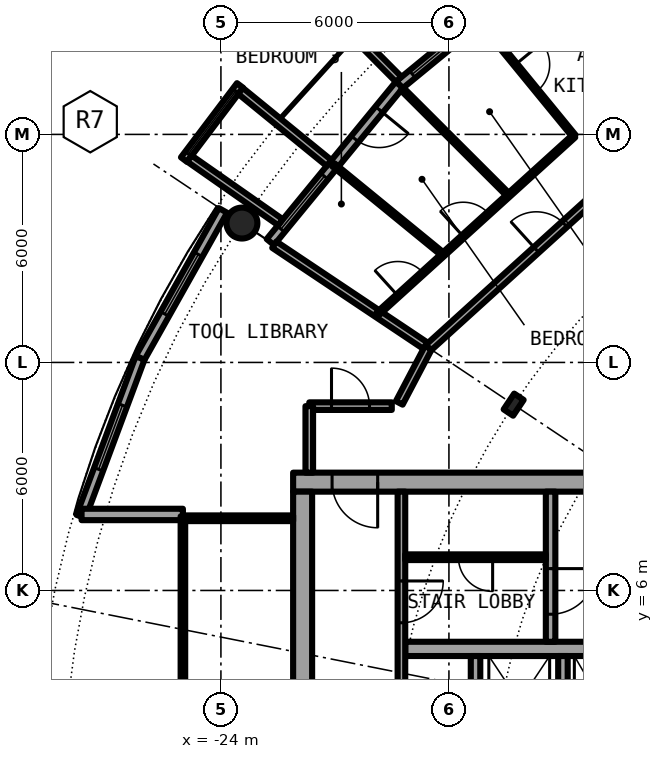
"""IFC4 building model, lengths in metres.
Left out: names, types, materials, properties, quantities, classifications, styles, units other than length and angle.
Written with IfcOpenShell. Run it as: python <this file> out.ifc"""

import sys

from ifc_helpers import new_model, si_unit, direction, frame, frame_2d, origin, origin_2d, place, context, subcontext, project, spatial, rectangle, circle, hollow_circle, i_section, extrude, element, fill, save


model = new_model("IFC4")
c1 = context("Model", 3, precision=1e-05, world=origin(), true_north=direction((0.0, 1.0)))
c2 = subcontext(c1, "Body", "Model", "MODEL_VIEW")
j1 = project(units=[si_unit("LENGTHUNIT", "METRE"), si_unit("PLANEANGLEUNIT", "RADIAN")], contexts=[c1])
p1 = place(None, origin())
s1 = spatial("IfcSite", under=j1, at=p1, CompositionType="ELEMENT")
p2 = place(p1, origin())
s2 = spatial("IfcBuilding", under=s1, at=p2, CompositionType="ELEMENT")
p3 = place(p2, frame((0.0, 0.0, 154.35)))
s3 = spatial("IfcBuildingStorey", under=s2, at=p3, CompositionType="ELEMENT", Elevation=154.35)
p4 = place(p3, frame((-23.448, 15.667, 0.0), z_axis=(0.0, 0.0, 1.0), x_axis=(1.0, 0.0, 0.0)))
e1 = element("IfcColumn", 1, at=p4, inside=s3, PredefinedType="COLUMN", context=c2, shape_type="SweptSolid", body=[
    extrude(hollow_circle(Radius=0.406, WallThickness=0.04, at=origin_2d()), origin(), (0.0, 0.0, 1.0), 3.05),
])
p5 = place(p3, frame((-16.297, 10.889, 0.0), z_axis=(0.0, 0.0, 1.0), x_axis=(-0.831469612303, 0.55557023302, 0.0)))
e2 = element("IfcColumn", 2, at=p5, inside=s3, PredefinedType="COLUMN", context=c2, shape_type="SweptSolid", body=[
    extrude(i_section(OverallWidth=0.3, OverallDepth=0.5, WebThickness=0.014, FlangeThickness=0.028, FilletRadius=0.027, at=origin_2d()), origin(), (0.0, 0.0, 1.0), 3.05),
])
p6 = place(p3, frame((-15.167, 22.699, 0.0), z_axis=(0.0, 0.0, 1.0), x_axis=(-0.773019449054, -0.634382322723, 0.0)))
e3 = element("IfcWall", 3, at=p6, inside=s3, PredefinedType="SOLIDWALL", context=c2, shape_type="SweptSolid", body=[
    extrude(rectangle(XDim=5.352, YDim=0.25, at=frame_2d((2.676, 0.0))), origin(), (0.0, 0.0, 1.0), 2.7),
])
p7 = place(p6, frame((0.841, 0.0, 0.0)))
e4 = element("IfcOpeningElement", 4, at=p7, cuts=e3, PredefinedType="OPENING", context=c2, shape_type="SweptSolid", body=[
    extrude(rectangle(XDim=1.0, YDim=2.2, at=frame_2d((0.5, 1.1))), frame((0.0, 0.135, 0.0), z_axis=(0.0, -1.0, 0.0), x_axis=(1.0, 0.0, 0.0)), (0.0, 0.0, 1.0), 0.27),
])
p8 = place(p6, frame((3.111, 0.0, 0.3)))
e5 = element("IfcOpeningElement", 5, at=p8, cuts=e3, PredefinedType="OPENING", context=c2, shape_type="SweptSolid", body=[
    extrude(rectangle(XDim=1.8, YDim=2.1, at=frame_2d((0.9, 1.05))), frame((0.0, 0.135, 0.0), z_axis=(0.0, -1.0, 0.0), x_axis=(1.0, 0.0, 0.0)), (0.0, 0.0, 1.0), 0.27),
])
p9 = place(p3, frame((-19.323, 19.45, -0.03), z_axis=(0.0, 0.0, 1.0), x_axis=(-0.704476739375, 0.709727076896, 0.0)))
e6 = element("IfcWall", 6, at=p9, inside=s3, PredefinedType="SOLIDWALL", context=c2, shape_type="SweptSolid", body=[
    extrude(rectangle(XDim=2.883, YDim=0.2, at=frame_2d((1.441, 0.0))), origin(), (0.0, 0.0, 1.0), 2.73),
])
p10 = place(p3, frame((-19.304, 19.304, 0.0), z_axis=(0.0, 0.0, 1.0), x_axis=(-0.634382322723, -0.773019449054, 0.0)))
e7 = element("IfcWall", 7, at=p10, inside=s3, PredefinedType="SOLIDWALL", context=c2, shape_type="SweptSolid", body=[
    extrude(rectangle(XDim=5.352, YDim=0.25, at=frame_2d((2.676, 0.0))), origin(), (0.0, 0.0, 1.0), 2.7),
])
p11 = place(p10, frame((0.841, 0.0, 0.0)))
e8 = element("IfcOpeningElement", 8, at=p11, cuts=e7, PredefinedType="OPENING", context=c2, shape_type="SweptSolid", body=[
    extrude(rectangle(XDim=1.0, YDim=2.2, at=frame_2d((0.5, 1.1))), frame((0.0, 0.135, 0.0), z_axis=(0.0, -1.0, 0.0), x_axis=(1.0, 0.0, 0.0)), (0.0, 0.0, 1.0), 0.27),
])
p12 = place(p10, frame((3.111, 0.0, 0.3)))
e9 = element("IfcOpeningElement", 9, at=p12, cuts=e7, PredefinedType="OPENING", context=c2, shape_type="SweptSolid", body=[
    extrude(rectangle(XDim=1.8, YDim=2.1, at=frame_2d((0.9, 1.05))), frame((0.0, 0.135, 0.0), z_axis=(0.0, -1.0, 0.0), x_axis=(1.0, 0.0, 0.0)), (0.0, 0.0, 1.0), 0.27),
])
p13 = place(p3, frame((-23.497, 19.289, -0.03), z_axis=(0.0, 0.0, 1.0), x_axis=(-0.602806268067, -0.797887588059, 0.0)))
e10 = element("IfcWall", 10, at=p13, inside=s3, PredefinedType="SOLIDWALL", context=c2, shape_type="SweptSolid", body=[
    extrude(rectangle(XDim=2.447, YDim=0.2, at=frame_2d((1.223, 0.0))), origin(), (0.0, 0.0, 1.0), 2.73),
])
p14 = place(p13, frame((0.183, 0.0, 0.33)))
e11 = element("IfcOpeningElement", 11, at=p14, cuts=e10, PredefinedType="OPENING", context=c2, shape_type="SweptSolid", body=[
    extrude(circle(Radius=1.04, at=frame_2d((1.04, 1.04))), frame((0.0, 0.11, 0.0), z_axis=(0.0, -1.0, 0.0), x_axis=(1.0, 0.0, 0.0)), (0.0, 0.0, 1.0), 0.22),
])
p15 = place(p3, frame((-21.155, 17.246, -0.03), z_axis=(0.0, 0.0, 1.0), x_axis=(-0.775179004516, 0.631741648902, 0.0)))
e12 = element("IfcWall", 12, at=p15, inside=s3, PredefinedType="SOLIDWALL", context=c2, shape_type="SweptSolid", body=[
    extrude(rectangle(XDim=3.006, YDim=0.2, at=frame_2d((1.503, 0.0))), origin(), (0.0, 0.0, 1.0), 2.73),
])
p16 = place(p3, frame((-22.433, 15.688, -0.03), z_axis=(0.0, 0.0, 1.0), x_axis=(-0.819373043115, 0.573260687834, 0.0)))
e13 = element("IfcWall", 13, at=p16, inside=s3, PredefinedType="SOLIDWALL", context=c2, shape_type="SweptSolid", body=[
    extrude(rectangle(XDim=2.925, YDim=0.2, at=frame_2d((1.463, 0.0))), origin(), (0.0, 0.0, 1.0), 2.73),
])
p17 = place(p3, frame((-23.946, 16.0, 0.0), z_axis=(0.0, 0.0, 1.0), x_axis=(-0.489696356642, -0.871893042919, 0.0)))
e14 = element("IfcWall", 14, at=p17, inside=s3, PredefinedType="SOLIDWALL", context=c2, shape_type="SweptSolid", body=[
    extrude(rectangle(XDim=4.454, YDim=0.25, at=frame_2d((2.227, 0.0))), origin(), (0.0, 0.0, 1.0), 2.7),
])
p18 = place(p17, frame((1.327, 0.0, 0.3)))
e15 = element("IfcOpeningElement", 15, at=p18, cuts=e14, PredefinedType="OPENING", context=c2, shape_type="SweptSolid", body=[
    extrude(rectangle(XDim=1.8, YDim=2.1, at=frame_2d((0.9, 1.05))), frame((0.0, 0.135, 0.0), z_axis=(0.0, -1.0, 0.0), x_axis=(1.0, 0.0, 0.0)), (0.0, 0.0, 1.0), 0.27),
])
p19 = place(p3, frame((-26.127, 12.117, 0.0), z_axis=(0.0, 0.0, 1.0), x_axis=(-0.349247811493, -0.937030397675, 0.0)))
e16 = element("IfcWall", 16, at=p19, inside=s3, PredefinedType="SOLIDWALL", context=c2, shape_type="SweptSolid", body=[
    extrude(rectangle(XDim=4.452, YDim=0.25, at=frame_2d((2.226, 0.0))), origin(), (0.0, 0.0, 1.0), 2.7),
])
p20 = place(p19, frame((1.327, 0.0, 0.3)))
e17 = element("IfcOpeningElement", 17, at=p20, cuts=e16, PredefinedType="OPENING", context=c2, shape_type="SweptSolid", body=[
    extrude(rectangle(XDim=1.8, YDim=2.1, at=frame_2d((0.9, 1.05))), frame((0.0, 0.135, 0.0), z_axis=(0.0, -1.0, 0.0), x_axis=(1.0, 0.0, 0.0)), (0.0, 0.0, 1.0), 0.27),
])
p21 = place(p3, frame((-25.0, 8.0, 0.0), z_axis=(0.0, 0.0, 1.0), x_axis=(-1.0, 0.0, 0.0)))
e18 = element("IfcWall", 18, at=p21, inside=s3, PredefinedType="SOLIDWALL", context=c2, shape_type="SweptSolid", body=[
    extrude(rectangle(XDim=2.667, YDim=0.3, at=frame_2d((1.333, 0.0))), origin(), (0.0, 0.0, 1.0), 2.7),
])
p22 = place(p3, frame((-8.5, 8.85, 0.0), z_axis=(0.0, 0.0, 1.0), x_axis=(-1.0, 0.0, 0.0)))
e19 = element("IfcWall", 19, at=p22, inside=s3, PredefinedType="SHEAR", context=c2, shape_type="SweptSolid", body=[
    extrude(rectangle(XDim=13.6, YDim=0.5, at=frame_2d((6.8, 0.0))), origin(), (0.0, 0.0, 1.0), 3.05),
])
p23 = place(p22, frame((11.375, 0.0, 0.0)))
e20 = element("IfcOpeningElement", 20, at=p23, cuts=e19, PredefinedType="OPENING", context=c2, shape_type="SweptSolid", body=[
    extrude(rectangle(XDim=1.2, YDim=2.3, at=frame_2d((0.6, 1.15))), frame((0.0, 0.26, 0.0), z_axis=(0.0, -1.0, 0.0), x_axis=(1.0, 0.0, 0.0)), (0.0, 0.0, 1.0), 0.52),
])
p24 = place(p3, frame((-21.85, -8.6, 0.0), z_axis=(0.0, 0.0, 1.0), x_axis=(0.0, 1.0, 0.0)))
e21 = element("IfcWall", 21, at=p24, inside=s3, PredefinedType="SHEAR", context=c2, shape_type="SweptSolid", body=[
    extrude(rectangle(XDim=17.2, YDim=0.5, at=frame_2d((8.6, 0.0))), origin(), (0.0, 0.0, 1.0), 3.05),
])
p25 = place(p24, frame((7.7, 0.0, 0.0)))
e22 = element("IfcOpeningElement", 22, at=p25, cuts=e21, PredefinedType="OPENING", context=c2, shape_type="SweptSolid", body=[
    extrude(rectangle(XDim=1.8, YDim=2.3, at=frame_2d((0.9, 1.15))), frame((0.0, 0.26, 0.0), z_axis=(0.0, -1.0, 0.0), x_axis=(1.0, 0.0, 0.0)), (0.0, 0.0, 1.0), 0.52),
])
p26 = place(p3, frame((-9.0, 4.462, 0.0), z_axis=(0.0, 0.0, 1.0), x_axis=(-1.0, 0.0, 0.0)))
e23 = element("IfcWall", 23, at=p26, inside=s3, PredefinedType="SHEAR", context=c2, shape_type="SweptSolid", body=[
    extrude(rectangle(XDim=10.15, YDim=0.375, at=frame_2d((5.075, 0.0))), origin(), (0.0, 0.0, 1.0), 3.05),
])
p27 = place(p3, frame((-15.325, 8.6, 0.0), z_axis=(0.0, 0.0, 1.0), x_axis=(0.0, -1.0, 0.0)))
e24 = element("IfcWall", 24, at=p27, inside=s3, PredefinedType="SHEAR", context=c2, shape_type="SweptSolid", body=[
    extrude(rectangle(XDim=3.95, YDim=0.25, at=frame_2d((1.975, 0.0))), origin(), (0.0, 0.0, 1.0), 3.05),
])
p28 = place(p27, frame((2.025, 0.0, 0.0)))
e25 = element("IfcOpeningElement", 25, at=p28, cuts=e24, PredefinedType="OPENING", context=c2, shape_type="SweptSolid", body=[
    extrude(rectangle(XDim=1.2, YDim=2.3, at=frame_2d((0.6, 1.15))), frame((0.0, 0.135, 0.0), z_axis=(0.0, -1.0, 0.0), x_axis=(1.0, 0.0, 0.0)), (0.0, 0.0, 1.0), 0.27),
])
for number, where, z_axis, x_axis in (
    (26, (-15.0, 1.825, 0.0), (0.0, 0.0, 1.0), (0.0, 1.0, 0.0)),
    (27, (-17.3, 1.825, 0.0), (0.0, 0.0, 1.0), (0.0, 1.0, 0.0)),
):
    element("IfcWall", number, at=place(p3, frame(where, z_axis=z_axis, x_axis=x_axis)), inside=s3, PredefinedType="SOLIDWALL", context=c2, shape_type="SweptSolid", body=[
        extrude(rectangle(XDim=2.45, YDim=0.25, at=frame_2d((1.225, 0.0))), origin(), (0.0, 0.0, 1.0), 2.7),
    ])
p29 = place(p3, frame((-19.25, 8.6, 0.0), z_axis=(0.0, 0.0, 1.0), x_axis=(0.0, -1.0, 0.0)))
e28 = element("IfcWall", 28, at=p29, inside=s3, PredefinedType="SOLIDWALL", context=c2, shape_type="SweptSolid", body=[
    extrude(rectangle(XDim=7.025, YDim=0.2, at=frame_2d((3.513, 0.0))), origin(), (0.0, 0.0, 1.0), 2.7),
])
p30 = place(p29, frame((2.35, 0.0, 0.0)))
e29 = element("IfcOpeningElement", 29, at=p30, cuts=e28, PredefinedType="OPENING", context=c2, shape_type="SweptSolid", body=[
    extrude(rectangle(XDim=1.1, YDim=2.3, at=frame_2d((0.55, 1.15))), frame((0.0, 0.11, 0.0), z_axis=(0.0, -1.0, 0.0), x_axis=(1.0, 0.0, 0.0)), (0.0, 0.0, 1.0), 0.22),
])
p31 = place(p3, frame((-15.45, 6.875, 0.0), z_axis=(0.0, 0.0, 1.0), x_axis=(-1.0, 0.0, 0.0)))
e30 = element("IfcWall", 30, at=p31, inside=s3, PredefinedType="PARTITIONING", context=c2, shape_type="SweptSolid", body=[
    extrude(rectangle(XDim=3.7, YDim=0.15, at=frame_2d((1.85, 0.0))), origin(), (0.0, 0.0, 1.0), 2.7),
])
p32 = place(p31, frame((1.4, 0.0, 0.0)))
e31 = element("IfcOpeningElement", 31, at=p32, cuts=e30, PredefinedType="OPENING", context=c2, shape_type="SweptSolid", body=[
    extrude(rectangle(XDim=0.9, YDim=2.3, at=frame_2d((0.45, 1.15))), frame((0.0, 0.085, 0.0), z_axis=(0.0, -1.0, 0.0), x_axis=(1.0, 0.0, 0.0)), (0.0, 0.0, 1.0), 0.17),
])
p33 = place(p3, frame((-22.1, 7.9, 0.0), z_axis=(0.0, 0.0, 1.0), x_axis=(-1.0, 0.0, 0.0)))
e32 = element("IfcWall", 32, at=p33, inside=s3, PredefinedType="PARTITIONING", context=c2, shape_type="SweptSolid", body=[
    extrude(rectangle(XDim=2.84, YDim=0.15, at=frame_2d((1.42, 0.0))), origin(), (0.0, 0.0, 1.0), 2.7),
])
p34 = place(p3, frame((-25.0, 7.95, 0.0), z_axis=(0.0, 0.0, 1.0), x_axis=(0.0, -1.0, 0.0)))
e33 = element("IfcWall", 33, at=p34, inside=s3, PredefinedType="PARTITIONING", context=c2, shape_type="SweptSolid", body=[
    extrude(rectangle(XDim=15.9, YDim=0.12, at=frame_2d((7.95, 0.0))), origin(), (0.0, 0.0, 1.0), 2.7),
])
p35 = place(p34, frame((0.95, 0.0, 0.1)))
e34 = element("IfcOpeningElement", 34, at=p35, cuts=e33, PredefinedType="OPENING", context=c2, shape_type="SweptSolid", body=[
    extrude(rectangle(XDim=14.0, YDim=2.35, at=frame_2d((7.0, 1.175))), frame((0.0, 0.07, 0.0), z_axis=(0.0, -1.0, 0.0), x_axis=(1.0, 0.0, 0.0)), (0.0, 0.0, 1.0), 0.14),
])
p36 = place(p3, frame((-22.595, 15.098, 0.0), z_axis=(0.0, 0.0, 1.0), x_axis=(0.831387096605, -0.55569370664, 0.0)))
e35 = element("IfcWall", 35, at=p36, inside=s3, PredefinedType="PARTITIONING", context=c2, shape_type="SweptSolid", body=[
    extrude(rectangle(XDim=4.875, YDim=0.2, at=frame_2d((2.438, 0.0))), origin(), (0.0, 0.0, 1.0), 2.7),
])
p37 = place(p3, frame((-21.04, 17.199, 0.0), z_axis=(0.0, 0.0, 1.0), x_axis=(0.774321581607, -0.63279229472, 0.0)))
e36 = element("IfcWall", 36, at=p37, inside=s3, PredefinedType="PARTITIONING", context=c2, shape_type="SweptSolid", body=[
    extrude(rectangle(XDim=3.731, YDim=0.1, at=frame_2d((1.866, 0.0))), origin(), (0.0, 0.0, 1.0), 2.7),
])
p38 = place(p3, frame((-19.234, 19.197, 0.0), z_axis=(0.0, 0.0, 1.0), x_axis=(0.707722727509, -0.706490297858, 0.0)))
e37 = element("IfcWall", 37, at=p38, inside=s3, PredefinedType="PARTITIONING", context=c2, shape_type="SweptSolid", body=[
    extrude(rectangle(XDim=3.962, YDim=0.1, at=frame_2d((1.981, 0.0))), origin(), (0.0, 0.0, 1.0), 2.7),
])
p39 = place(p3, frame((-17.219, 21.023, 0.0), z_axis=(0.0, 0.0, 1.0), x_axis=(0.633590098448, -0.773668913133, 0.0)))
e38 = element("IfcWall", 38, at=p39, inside=s3, PredefinedType="PARTITIONING", context=c2, shape_type="SweptSolid", body=[
    extrude(rectangle(XDim=3.962, YDim=0.1, at=frame_2d((1.981, 0.0))), origin(), (0.0, 0.0, 1.0), 2.7),
])
p40 = place(p39, frame((1.531, 0.0, 0.0)))
e39 = element("IfcOpeningElement", 39, at=p40, cuts=e38, PredefinedType="OPENING", context=c2, shape_type="SweptSolid", body=[
    extrude(rectangle(XDim=0.9, YDim=2.3, at=frame_2d((0.45, 1.15))), frame((0.0, 0.06, 0.0), z_axis=(0.0, -1.0, 0.0), x_axis=(1.0, 0.0, 0.0)), (0.0, 0.0, 1.0), 0.12),
])
p41 = place(p3, frame((-21.675, 10.85, 0.0), z_axis=(0.0, 0.0, 1.0), x_axis=(1.0, 0.0, 0.0)))
e40 = element("IfcWall", 40, at=p41, inside=s3, PredefinedType="PARTITIONING", context=c2, shape_type="SweptSolid", body=[
    extrude(rectangle(XDim=2.171, YDim=0.2, at=frame_2d((1.085, 0.0))), origin(), (0.0, 0.0, 1.0), 2.7),
])
p42 = place(p41, frame((0.585, 0.0, 0.0)))
e41 = element("IfcOpeningElement", 41, at=p42, cuts=e40, PredefinedType="OPENING", context=c2, shape_type="SweptSolid", body=[
    extrude(rectangle(XDim=1.0, YDim=2.3, at=frame_2d((0.5, 1.15))), frame((0.0, 0.11, 0.0), z_axis=(0.0, -1.0, 0.0), x_axis=(1.0, 0.0, 0.0)), (0.0, 0.0, 1.0), 0.22),
])
p43 = place(p3, frame((-18.544, 12.385, 0.0), z_axis=(0.0, 0.0, 1.0), x_axis=(0.740849323054, 0.67167125927, 0.0)))
e42 = element("IfcWall", 42, at=p43, inside=s3, PredefinedType="PARTITIONING", context=c2, shape_type="SweptSolid", body=[
    extrude(rectangle(XDim=10.842, YDim=0.2, at=frame_2d((5.421, 0.0))), origin(), (0.0, 0.0, 1.0), 2.7),
])
p44 = place(p43, frame((3.839, 0.0, 0.0)))
e43 = element("IfcOpeningElement", 43, at=p44, cuts=e42, PredefinedType="OPENING", context=c2, shape_type="SweptSolid", body=[
    extrude(rectangle(XDim=1.0, YDim=2.3, at=frame_2d((0.5, 1.15))), frame((0.0, 0.11, 0.0), z_axis=(0.0, -1.0, 0.0), x_axis=(1.0, 0.0, 0.0)), (0.0, 0.0, 1.0), 0.22),
])
p45 = place(p3, frame((-21.675, 9.1, 0.0), z_axis=(0.0, 0.0, 1.0), x_axis=(0.0, 1.0, 0.0)))
e44 = element("IfcWall", 44, at=p45, inside=s3, PredefinedType="PARTITIONING", context=c2, shape_type="SweptSolid", body=[
    extrude(rectangle(XDim=1.75, YDim=0.2, at=frame_2d((0.875, 0.0))), origin(), (0.0, 0.0, 1.0), 2.7),
])
p46 = place(p3, frame((-19.307, 10.935, 0.0), z_axis=(0.0, 0.0, 1.0), x_axis=(0.465605550524, 0.884992356646, 0.0)))
e45 = element("IfcWall", 45, at=p46, inside=s3, PredefinedType="PARTITIONING", context=c2, shape_type="SweptSolid", body=[
    extrude(rectangle(XDim=1.643, YDim=0.2, at=frame_2d((0.821, 0.0))), origin(), (0.0, 0.0, 1.0), 2.7),
])
p47 = place(p3, frame((-19.872, 13.278, 0.0), z_axis=(0.0, 0.0, 1.0), x_axis=(0.740923753351, 0.671589153962, 0.0)))
e46 = element("IfcWall", 46, at=p47, inside=s3, PredefinedType="PARTITIONING", context=c2, shape_type="SweptSolid", body=[
    extrude(rectangle(XDim=6.969, YDim=0.1, at=frame_2d((3.484, 0.0))), origin(), (0.0, 0.0, 1.0), 2.7),
])
p48 = place(p47, frame((3.034, 0.0, 0.0)))
e47 = element("IfcOpeningElement", 47, at=p48, cuts=e46, PredefinedType="OPENING", context=c2, shape_type="SweptSolid", body=[
    extrude(rectangle(XDim=0.9, YDim=2.3, at=frame_2d((0.45, 1.15))), frame((0.0, 0.06, 0.0), z_axis=(0.0, -1.0, 0.0), x_axis=(1.0, 0.0, 0.0)), (0.0, 0.0, 1.0), 0.12),
])
p49 = place(p47, frame((0.711, 0.0, 0.0)))
e48 = element("IfcOpeningElement", 48, at=p49, cuts=e46, PredefinedType="OPENING", context=c2, shape_type="SweptSolid", body=[
    extrude(rectangle(XDim=0.9, YDim=2.3, at=frame_2d((0.45, 1.15))), frame((0.0, 0.06, 0.0), z_axis=(0.0, -1.0, 0.0), x_axis=(1.0, 0.0, 0.0)), (0.0, 0.0, 1.0), 0.12),
])
p50 = place(p8, origin())
e49 = element("IfcWindow", 49, at=p50, inside=s3, PartitioningType="SINGLE_PANEL", PredefinedType="WINDOW", context=c2, shape_type="SweptSolid", body=[
    extrude(rectangle(XDim=1.8, YDim=2.1, at=frame_2d((0.9, 1.05))), frame((0.0, 0.03, 0.0), z_axis=(0.0, -1.0, 0.0), x_axis=(1.0, 0.0, 0.0)), (0.0, 0.0, 1.0), 0.06),
])
fill(e5, e49)
p51 = place(p11, origin())
e50 = element("IfcDoor", 50, at=p51, inside=s3, OperationType="SINGLE_SWING_LEFT", PredefinedType="DOOR", context=c2, shape_type="SweptSolid", body=[
    extrude(rectangle(XDim=1.0, YDim=2.2, at=frame_2d((0.5, 1.1))), frame((0.0, 0.025, 0.0), z_axis=(0.0, -1.0, 0.0), x_axis=(1.0, 0.0, 0.0)), (0.0, 0.0, 1.0), 0.05),
])
fill(e8, e50)
p52 = place(p12, origin())
e51 = element("IfcWindow", 51, at=p52, inside=s3, PartitioningType="SINGLE_PANEL", PredefinedType="WINDOW", context=c2, shape_type="SweptSolid", body=[
    extrude(rectangle(XDim=1.8, YDim=2.1, at=frame_2d((0.9, 1.05))), frame((0.0, 0.03, 0.0), z_axis=(0.0, -1.0, 0.0), x_axis=(1.0, 0.0, 0.0)), (0.0, 0.0, 1.0), 0.06),
])
fill(e9, e51)
p53 = place(p14, origin())
e52 = element("IfcWindow", 52, at=p53, inside=s3, PartitioningType="SINGLE_PANEL", PredefinedType="WINDOW", context=c2, shape_type="SweptSolid", body=[
    extrude(circle(Radius=1.04, at=frame_2d((1.04, 1.04))), frame((0.0, 0.03, 0.0), z_axis=(0.0, -1.0, 0.0), x_axis=(1.0, 0.0, 0.0)), (0.0, 0.0, 1.0), 0.06),
])
fill(e11, e52)
p54 = place(p18, origin())
e53 = element("IfcWindow", 53, at=p54, inside=s3, PartitioningType="SINGLE_PANEL", PredefinedType="WINDOW", context=c2, shape_type="SweptSolid", body=[
    extrude(rectangle(XDim=1.8, YDim=2.1, at=frame_2d((0.9, 1.05))), frame((0.0, 0.03, 0.0), z_axis=(0.0, -1.0, 0.0), x_axis=(1.0, 0.0, 0.0)), (0.0, 0.0, 1.0), 0.06),
])
fill(e15, e53)
p55 = place(p20, origin())
e54 = element("IfcWindow", 54, at=p55, inside=s3, PartitioningType="SINGLE_PANEL", PredefinedType="WINDOW", context=c2, shape_type="SweptSolid", body=[
    extrude(rectangle(XDim=1.8, YDim=2.1, at=frame_2d((0.9, 1.05))), frame((0.0, 0.03, 0.0), z_axis=(0.0, -1.0, 0.0), x_axis=(1.0, 0.0, 0.0)), (0.0, 0.0, 1.0), 0.06),
])
fill(e17, e54)
p56 = place(p32, origin())
e55 = element("IfcDoor", 55, at=p56, inside=s3, OperationType="SINGLE_SWING_LEFT", PredefinedType="DOOR", context=c2, shape_type="SweptSolid", body=[
    extrude(rectangle(XDim=0.9, YDim=2.3, at=frame_2d((0.45, 1.15))), frame((0.0, 0.025, 0.0), z_axis=(0.0, -1.0, 0.0), x_axis=(1.0, 0.0, 0.0)), (0.0, 0.0, 1.0), 0.05),
])
fill(e31, e55)
p57 = place(p28, origin())
e56 = element("IfcDoor", 56, at=p57, inside=s3, OperationType="SINGLE_SWING_LEFT", PredefinedType="DOOR", context=c2, shape_type="SweptSolid", body=[
    extrude(rectangle(XDim=1.2, YDim=2.3, at=frame_2d((0.6, 1.15))), frame((0.0, 0.025, 0.0), z_axis=(0.0, -1.0, 0.0), x_axis=(1.0, 0.0, 0.0)), (0.0, 0.0, 1.0), 0.05),
])
fill(e25, e56)
p58 = place(p30, origin())
e57 = element("IfcDoor", 57, at=p58, inside=s3, OperationType="SINGLE_SWING_RIGHT", PredefinedType="DOOR", context=c2, shape_type="SweptSolid", body=[
    extrude(rectangle(XDim=1.1, YDim=2.3, at=frame_2d((0.55, 1.15))), frame((0.0, 0.025, 0.0), z_axis=(0.0, -1.0, 0.0), x_axis=(1.0, 0.0, 0.0)), (0.0, 0.0, 1.0), 0.05),
])
fill(e29, e57)
p59 = place(p23, origin())
e58 = element("IfcDoor", 58, at=p59, inside=s3, OperationType="SINGLE_SWING_LEFT", PredefinedType="DOOR", context=c2, shape_type="SweptSolid", body=[
    extrude(rectangle(XDim=1.2, YDim=2.3, at=frame_2d((0.6, 1.15))), frame((0.0, 0.025, 0.0), z_axis=(0.0, -1.0, 0.0), x_axis=(1.0, 0.0, 0.0)), (0.0, 0.0, 1.0), 0.05),
])
fill(e20, e58)
p60 = place(p35, origin())
e59 = element("IfcWindow", 59, at=p60, inside=s3, PartitioningType="SINGLE_PANEL", PredefinedType="WINDOW", context=c2, shape_type="SweptSolid", body=[
    extrude(rectangle(XDim=14.0, YDim=2.35, at=frame_2d((7.0, 1.175))), frame((0.0, 0.03, 0.0), z_axis=(0.0, -1.0, 0.0), x_axis=(1.0, 0.0, 0.0)), (0.0, 0.0, 1.0), 0.06),
])
fill(e34, e59)
p61 = place(p44, origin())
e60 = element("IfcDoor", 60, at=p61, inside=s3, OperationType="SINGLE_SWING_LEFT", PredefinedType="DOOR", context=c2, shape_type="SweptSolid", body=[
    extrude(rectangle(XDim=1.0, YDim=2.3, at=frame_2d((0.5, 1.15))), frame((0.0, 0.025, 0.0), z_axis=(0.0, -1.0, 0.0), x_axis=(1.0, 0.0, 0.0)), (0.0, 0.0, 1.0), 0.05),
])
fill(e43, e60)
p62 = place(p40, origin())
e61 = element("IfcDoor", 61, at=p62, inside=s3, OperationType="SINGLE_SWING_LEFT", PredefinedType="DOOR", context=c2, shape_type="SweptSolid", body=[
    extrude(rectangle(XDim=0.9, YDim=2.3, at=frame_2d((0.45, 1.15))), frame((0.0, 0.025, 0.0), z_axis=(0.0, -1.0, 0.0), x_axis=(1.0, 0.0, 0.0)), (0.0, 0.0, 1.0), 0.05),
])
fill(e39, e61)
p63 = place(p48, origin())
e62 = element("IfcDoor", 62, at=p63, inside=s3, OperationType="SINGLE_SWING_RIGHT", PredefinedType="DOOR", context=c2, shape_type="SweptSolid", body=[
    extrude(rectangle(XDim=0.9, YDim=2.3, at=frame_2d((0.45, 1.15))), frame((0.0, 0.025, 0.0), z_axis=(0.0, -1.0, 0.0), x_axis=(1.0, 0.0, 0.0)), (0.0, 0.0, 1.0), 0.05),
])
fill(e47, e62)
p64 = place(p49, origin())
e63 = element("IfcDoor", 63, at=p64, inside=s3, OperationType="SINGLE_SWING_LEFT", PredefinedType="DOOR", context=c2, shape_type="SweptSolid", body=[
    extrude(rectangle(XDim=0.9, YDim=2.3, at=frame_2d((0.45, 1.15))), frame((0.0, 0.025, 0.0), z_axis=(0.0, -1.0, 0.0), x_axis=(1.0, 0.0, 0.0)), (0.0, 0.0, 1.0), 0.05),
])
fill(e48, e63)
p65 = place(p42, origin())
e64 = element("IfcDoor", 64, at=p65, inside=s3, OperationType="SINGLE_SWING_LEFT", PredefinedType="DOOR", context=c2, shape_type="SweptSolid", body=[
    extrude(rectangle(XDim=1.0, YDim=2.3, at=frame_2d((0.5, 1.15))), frame((0.0, 0.025, 0.0), z_axis=(0.0, -1.0, 0.0), x_axis=(1.0, 0.0, 0.0)), (0.0, 0.0, 1.0), 0.05),
])
fill(e41, e64)
save(model, sys.argv[1])
